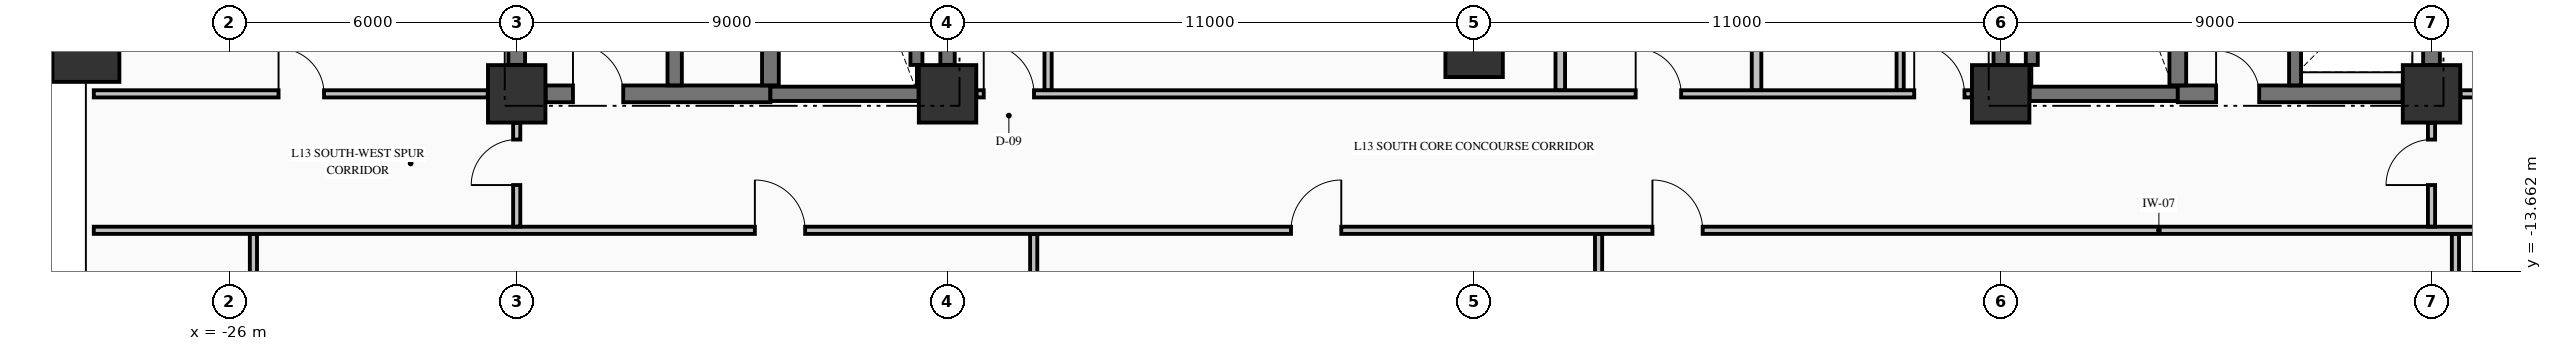
"""IFC4 building model, lengths in metres.
Left out: names, types, materials, properties, quantities, classifications, styles, units other than length and angle.
Written with IfcOpenShell. Run it as: python <this file> out.ifc"""

import sys

from ifc_helpers import new_model, si_unit, direction, frame, frame_2d, origin, origin_2d, place, context, subcontext, project, spatial, rectangle, extrude, element, fill, save


model = new_model("IFC4")
c1 = context("Model", 3, precision=1e-05, world=origin(), true_north=direction((0.0, 1.0)))
c2 = subcontext(c1, "Body", "Model", "MODEL_VIEW")
j1 = project(units=[si_unit("LENGTHUNIT", "METRE"), si_unit("PLANEANGLEUNIT", "RADIAN")], contexts=[c1])
p1 = place(None, origin())
s1 = spatial("IfcSite", under=j1, at=p1, CompositionType="ELEMENT")
p2 = place(p1, origin())
s2 = spatial("IfcBuilding", under=s1, at=p2, CompositionType="ELEMENT")
p3 = place(p2, frame((0.0, 0.0, 57.19)))
s3 = spatial("IfcBuildingStorey", under=s2, at=p3, CompositionType="ELEMENT", Elevation=57.19)
p4 = place(p3, frame((-29.0, -9.0, -0.425), z_axis=(0.0, 0.0, 1.0), x_axis=(1.0, 0.0, 0.0)))
e1 = element("IfcColumn", 1, at=p4, inside=s3, PredefinedType="COLUMN", context=c2, shape_type="SweptSolid", body=[
    extrude(rectangle(XDim=1.4, YDim=1.4, at=origin_2d()), origin(), (0.0, 0.0, 1.0), 3.695),
])
for number, where, z_axis, x_axis in (
    (2, (-20.0, -9.95, -0.425), (0.0, 0.0, 1.0), (1.0, 0.0, 0.0)),
    (3, (-11.0, -9.95, -0.425), (0.0, 0.0, 1.0), (1.0, 0.0, 0.0)),
    (4, (11.0, -9.95, -0.425), (0.0, 0.0, 1.0), (1.0, 0.0, 0.0)),
    (5, (20.0, -9.95, -0.425), (0.0, 0.0, 1.0), (1.0, 0.0, 0.0)),
    (6, (0.0, -9.0, -0.425), (0.0, 0.0, 1.0), (1.0, 0.0, 0.0)),
):
    element("IfcColumn", number, at=place(p3, frame(where, z_axis=z_axis, x_axis=x_axis)), inside=s3, PredefinedType="COLUMN", context=c2, shape_type="SweptSolid", body=[
        extrude(rectangle(XDim=1.2, YDim=1.2, at=origin_2d()), origin(), (0.0, 0.0, 1.0), 3.695),
    ])
p5 = place(p3, frame((-19.396, -9.95, 0.0), z_axis=(0.0, 0.0, 1.0), x_axis=(1.0, 0.0, 0.0)))
e7 = element("IfcWall", 7, at=p5, inside=s3, PredefinedType="SHEAR", context=c2, shape_type="SweptSolid", body=[
    extrude(rectangle(XDim=4.696, YDim=0.35, at=frame_2d((2.348, 0.0))), origin(), (0.0, 0.0, 1.0), 3.27),
])
p6 = place(p5, frame((0.571, 0.0, 0.0)))
e8 = element("IfcOpeningElement", 8, at=p6, cuts=e7, PredefinedType="OPENING", context=c2, shape_type="SweptSolid", body=[
    extrude(rectangle(XDim=1.05, YDim=2.15, at=frame_2d((0.525, 1.075))), frame((0.0, 0.185, 0.0), z_axis=(0.0, -1.0, 0.0), x_axis=(1.0, 0.0, 0.0)), (0.0, 0.0, 1.0), 0.37),
])
for number, where, z_axis, x_axis in (
    (9, (-14.7, -9.95, 0.0), (0.0, 0.0, 1.0), (1.0, 0.0, 0.0)),
    (10, (11.604, -9.95, 0.0), (0.0, 0.0, 1.0), (1.0, 0.0, 0.0)),
):
    element("IfcWall", number, at=place(p3, frame(where, z_axis=z_axis, x_axis=x_axis)), inside=s3, PredefinedType="SHEAR", context=c2, shape_type="SweptSolid", body=[
        extrude(rectangle(XDim=3.096, YDim=0.3, at=frame_2d((1.548, 0.0))), origin(), (0.0, 0.0, 1.0), 3.27),
    ])
p7 = place(p3, frame((14.7, -9.95, 0.0), z_axis=(0.0, 0.0, 1.0), x_axis=(1.0, 0.0, 0.0)))
e11 = element("IfcWall", 11, at=p7, inside=s3, PredefinedType="SHEAR", context=c2, shape_type="SweptSolid", body=[
    extrude(rectangle(XDim=4.696, YDim=0.35, at=frame_2d((2.348, 0.0))), origin(), (0.0, 0.0, 1.0), 3.27),
])
p8 = place(p7, frame((0.8, 0.0, 0.0)))
e12 = element("IfcOpeningElement", 12, at=p8, cuts=e11, PredefinedType="OPENING", context=c2, shape_type="SweptSolid", body=[
    extrude(rectangle(XDim=0.9, YDim=2.15, at=frame_2d((0.45, 1.075))), frame((0.0, 0.185, 0.0), z_axis=(0.0, -1.0, 0.0), x_axis=(1.0, 0.0, 0.0)), (0.0, 0.0, 1.0), 0.37),
])
p9 = place(p3, frame((-28.835, -12.8, 0.0), z_axis=(0.0, 0.0, 1.0), x_axis=(1.0, 0.0, 0.0)))
e13 = element("IfcWall", 13, at=p9, inside=s3, PredefinedType="PARTITIONING", context=c2, shape_type="SweptSolid", body=[
    extrude(rectangle(XDim=52.67, YDim=0.15, at=frame_2d((26.335, 0.0))), origin(), (0.0, 0.0, 1.0), 3.27),
])
p10 = place(p9, frame((13.81, 0.0, 0.0)))
e14 = element("IfcOpeningElement", 14, at=p10, cuts=e13, PredefinedType="OPENING", context=c2, shape_type="SweptSolid", body=[
    extrude(rectangle(XDim=1.05, YDim=2.15, at=frame_2d((0.525, 1.075))), frame((0.0, 0.085, 0.0), z_axis=(0.0, -1.0, 0.0), x_axis=(1.0, 0.0, 0.0)), (0.0, 0.0, 1.0), 0.17),
])
p11 = place(p9, frame((25.01, 0.0, 0.0)))
e15 = element("IfcOpeningElement", 15, at=p11, cuts=e13, PredefinedType="OPENING", context=c2, shape_type="SweptSolid", body=[
    extrude(rectangle(XDim=1.05, YDim=2.15, at=frame_2d((0.525, 1.075))), frame((0.0, 0.085, 0.0), z_axis=(0.0, -1.0, 0.0), x_axis=(1.0, 0.0, 0.0)), (0.0, 0.0, 1.0), 0.17),
])
p12 = place(p9, frame((32.56, 0.0, 0.0)))
e16 = element("IfcOpeningElement", 16, at=p12, cuts=e13, PredefinedType="OPENING", context=c2, shape_type="SweptSolid", body=[
    extrude(rectangle(XDim=1.05, YDim=2.15, at=frame_2d((0.525, 1.075))), frame((0.0, 0.085, 0.0), z_axis=(0.0, -1.0, 0.0), x_axis=(1.0, 0.0, 0.0)), (0.0, 0.0, 1.0), 0.17),
])
p13 = place(p3, frame((-28.835, -9.95, 0.0), z_axis=(0.0, 0.0, 1.0), x_axis=(1.0, 0.0, 0.0)))
e17 = element("IfcWall", 17, at=p13, inside=s3, PredefinedType="PARTITIONING", context=c2, shape_type="SweptSolid", body=[
    extrude(rectangle(XDim=8.229, YDim=0.15, at=frame_2d((4.115, 0.0))), origin(), (0.0, 0.0, 1.0), 3.27),
])
p14 = place(p13, frame((3.86, 0.0, 0.0)))
e18 = element("IfcOpeningElement", 18, at=p14, cuts=e17, PredefinedType="OPENING", context=c2, shape_type="SweptSolid", body=[
    extrude(rectangle(XDim=0.95, YDim=2.15, at=frame_2d((0.475, 1.075))), frame((0.0, 0.085, 0.0), z_axis=(0.0, -1.0, 0.0), x_axis=(1.0, 0.0, 0.0)), (0.0, 0.0, 1.0), 0.17),
])
p15 = place(p3, frame((-10.394, -9.95, 0.0), z_axis=(0.0, 0.0, 1.0), x_axis=(1.0, 0.0, 0.0)))
e19 = element("IfcWall", 19, at=p15, inside=s3, PredefinedType="PARTITIONING", context=c2, shape_type="SweptSolid", body=[
    extrude(rectangle(XDim=20.788, YDim=0.15, at=frame_2d((10.394, 0.0))), origin(), (0.0, 0.0, 1.0), 3.27),
])
p16 = place(p15, frame((0.15, 0.0, 0.0)))
e20 = element("IfcOpeningElement", 20, at=p16, cuts=e19, PredefinedType="OPENING", context=c2, shape_type="SweptSolid", body=[
    extrude(rectangle(XDim=1.05, YDim=2.15, at=frame_2d((0.525, 1.075))), frame((0.0, 0.085, 0.0), z_axis=(0.0, -1.0, 0.0), x_axis=(1.0, 0.0, 0.0)), (0.0, 0.0, 1.0), 0.17),
])
p17 = place(p15, frame((19.588, 0.0, 0.0)))
e21 = element("IfcOpeningElement", 21, at=p17, cuts=e19, PredefinedType="OPENING", context=c2, shape_type="SweptSolid", body=[
    extrude(rectangle(XDim=1.05, YDim=2.15, at=frame_2d((0.525, 1.075))), frame((0.0, 0.085, 0.0), z_axis=(0.0, -1.0, 0.0), x_axis=(1.0, 0.0, 0.0)), (0.0, 0.0, 1.0), 0.17),
])
p18 = place(p15, frame((13.769, 0.0, 0.0)))
e22 = element("IfcOpeningElement", 22, at=p18, cuts=e19, PredefinedType="OPENING", context=c2, shape_type="SweptSolid", body=[
    extrude(rectangle(XDim=0.95, YDim=2.15, at=frame_2d((0.475, 1.075))), frame((0.0, 0.085, 0.0), z_axis=(0.0, -1.0, 0.0), x_axis=(1.0, 0.0, 0.0)), (0.0, 0.0, 1.0), 0.17),
])
p19 = place(p3, frame((20.606, -9.95, 0.0), z_axis=(0.0, 0.0, 1.0), x_axis=(1.0, 0.0, 0.0)))
e23 = element("IfcWall", 23, at=p19, inside=s3, PredefinedType="PARTITIONING", context=c2, shape_type="SweptSolid", body=[
    extrude(rectangle(XDim=3.229, YDim=0.15, at=frame_2d((1.615, 0.0))), origin(), (0.0, 0.0, 1.0), 3.27),
])
p20 = place(p19, frame((0.894, 0.0, 0.0)))
e24 = element("IfcOpeningElement", 24, at=p20, cuts=e23, PredefinedType="OPENING", context=c2, shape_type="SweptSolid", body=[
    extrude(rectangle(XDim=1.0, YDim=2.15, at=frame_2d((0.5, 1.075))), frame((0.0, 0.085, 0.0), z_axis=(0.0, -1.0, 0.0), x_axis=(1.0, 0.0, 0.0)), (0.0, 0.0, 1.0), 0.17),
])
p21 = place(p3, frame((-20.0, -9.346, 0.0), z_axis=(0.0, 0.0, 1.0), x_axis=(0.0, 1.0, 0.0)))
e25 = element("IfcWall", 25, at=p21, inside=s3, PredefinedType="SHEAR", context=c2, shape_type="SweptSolid", body=[
    extrude(rectangle(XDim=8.742, YDim=0.35, at=frame_2d((4.371, 0.0))), origin(), (0.0, 0.0, 1.0), 3.27),
])
p22 = place(p3, frame((-16.7, -9.773, 0.0), z_axis=(0.0, 0.0, 1.0), x_axis=(0.0, 1.0, 0.0)))
e26 = element("IfcWall", 26, at=p22, inside=s3, PredefinedType="SHEAR", context=c2, shape_type="SweptSolid", body=[
    extrude(rectangle(XDim=9.371, YDim=0.3, at=frame_2d((4.686, 0.0))), origin(), (0.0, 0.0, 1.0), 3.27),
])
p23 = place(p3, frame((-14.7, -9.773, 0.0), z_axis=(0.0, 0.0, 1.0), x_axis=(0.0, 1.0, 0.0)))
e27 = element("IfcWall", 27, at=p23, inside=s3, PredefinedType="SHEAR", context=c2, shape_type="SweptSolid", body=[
    extrude(rectangle(XDim=9.371, YDim=0.35, at=frame_2d((4.686, 0.0))), origin(), (0.0, 0.0, 1.0), 3.27),
])
p24 = place(p3, frame((-11.65, -9.346, 0.0), z_axis=(0.0, 0.0, 1.0), x_axis=(0.0, 1.0, 0.0)))
e28 = element("IfcWall", 28, at=p24, inside=s3, PredefinedType="SOLIDWALL", context=c2, shape_type="SweptSolid", body=[
    extrude(rectangle(XDim=8.742, YDim=0.25, at=frame_2d((4.371, 0.0))), origin(), (0.0, 0.0, 1.0), 3.27),
])
for number, where, z_axis, x_axis in (
    (29, (-11.0, -9.346, 0.0), (0.0, 0.0, 1.0), (0.0, 1.0, 0.0)),
    (30, (11.0, -9.346, 0.0), (0.0, 0.0, 1.0), (0.0, 1.0, 0.0)),
):
    element("IfcWall", number, at=place(p3, frame(where, z_axis=z_axis, x_axis=x_axis)), inside=s3, PredefinedType="SHEAR", context=c2, shape_type="SweptSolid", body=[
        extrude(rectangle(XDim=8.742, YDim=0.3, at=frame_2d((4.371, 0.0))), origin(), (0.0, 0.0, 1.0), 3.27),
    ])
p25 = place(p3, frame((11.65, -9.346, 0.0), z_axis=(0.0, 0.0, 1.0), x_axis=(0.0, 1.0, 0.0)))
e31 = element("IfcWall", 31, at=p25, inside=s3, PredefinedType="SOLIDWALL", context=c2, shape_type="SweptSolid", body=[
    extrude(rectangle(XDim=8.742, YDim=0.25, at=frame_2d((4.371, 0.0))), origin(), (0.0, 0.0, 1.0), 3.27),
])
p26 = place(p3, frame((14.7, -9.773, 0.0), z_axis=(0.0, 0.0, 1.0), x_axis=(0.0, 1.0, 0.0)))
e32 = element("IfcWall", 32, at=p26, inside=s3, PredefinedType="SHEAR", context=c2, shape_type="SweptSolid", body=[
    extrude(rectangle(XDim=9.371, YDim=0.35, at=frame_2d((4.686, 0.0))), origin(), (0.0, 0.0, 1.0), 3.27),
])
p27 = place(p3, frame((17.15, -9.773, 0.0), z_axis=(0.0, 0.0, 1.0), x_axis=(0.0, 1.0, 0.0)))
e33 = element("IfcWall", 33, at=p27, inside=s3, PredefinedType="SOLIDWALL", context=c2, shape_type="SweptSolid", body=[
    extrude(rectangle(XDim=2.596, YDim=0.25, at=frame_2d((1.298, 0.0))), origin(), (0.0, 0.0, 1.0), 3.27),
])
p28 = place(p3, frame((20.0, -9.346, 0.0), z_axis=(0.0, 0.0, 1.0), x_axis=(0.0, 1.0, 0.0)))
e34 = element("IfcWall", 34, at=p28, inside=s3, PredefinedType="SHEAR", context=c2, shape_type="SweptSolid", body=[
    extrude(rectangle(XDim=2.169, YDim=0.35, at=frame_2d((1.084, 0.0))), origin(), (0.0, 0.0, 1.0), 3.27),
])
p29 = place(p3, frame((-25.5, -22.294, 0.0), z_axis=(0.0, 0.0, 1.0), x_axis=(0.0, 1.0, 0.0)))
e35 = element("IfcWall", 35, at=p29, inside=s3, PredefinedType="PARTITIONING", context=c2, shape_type="SweptSolid", body=[
    extrude(rectangle(XDim=9.416, YDim=0.15, at=frame_2d((4.708, 0.0))), origin(), (0.0, 0.0, 1.0), 3.27),
])
p30 = place(p3, frame((-20.0, -12.722, 0.0), z_axis=(0.0, 0.0, 1.0), x_axis=(0.0, 1.0, 0.0)))
e36 = element("IfcWall", 36, at=p30, inside=s3, PredefinedType="PARTITIONING", context=c2, shape_type="SweptSolid", body=[
    extrude(rectangle(XDim=2.166, YDim=0.15, at=frame_2d((1.083, 0.0))), origin(), (0.0, 0.0, 1.0), 2.61),
])
p31 = place(p30, frame((0.867, 0.0, 0.0)))
e37 = element("IfcOpeningElement", 37, at=p31, cuts=e36, PredefinedType="OPENING", context=c2, shape_type="SweptSolid", body=[
    extrude(rectangle(XDim=0.95, YDim=2.15, at=frame_2d((0.475, 1.075))), frame((0.0, 0.085, 0.0), z_axis=(0.0, -1.0, 0.0), x_axis=(1.0, 0.0, 0.0)), (0.0, 0.0, 1.0), 0.17),
])
p32 = place(p3, frame((-9.2, -26.335, 0.0), z_axis=(0.0, 0.0, 1.0), x_axis=(0.0, 1.0, 0.0)))
e38 = element("IfcWall", 38, at=p32, inside=s3, PredefinedType="PARTITIONING", context=c2, shape_type="SweptSolid", body=[
    extrude(rectangle(XDim=13.457, YDim=0.15, at=frame_2d((6.729, 0.0))), origin(), (0.0, 0.0, 1.0), 3.27),
])
p33 = place(p3, frame((-8.9, -9.872, 0.0), z_axis=(0.0, 0.0, 1.0), x_axis=(0.0, 1.0, 0.0)))
e39 = element("IfcWall", 39, at=p33, inside=s3, PredefinedType="PARTITIONING", context=c2, shape_type="SweptSolid", body=[
    extrude(rectangle(XDim=11.969, YDim=0.15, at=frame_2d((5.984, 0.0))), origin(), (0.0, 0.0, 1.0), 3.27),
])
p34 = place(p33, frame((5.527, 0.0, 0.0)))
e40 = element("IfcOpeningElement", 40, at=p34, cuts=e39, PredefinedType="OPENING", context=c2, shape_type="SweptSolid", body=[
    extrude(rectangle(XDim=0.95, YDim=2.15, at=frame_2d((0.475, 1.075))), frame((0.0, 0.085, 0.0), z_axis=(0.0, -1.0, 0.0), x_axis=(1.0, 0.0, 0.0)), (0.0, 0.0, 1.0), 0.17),
])
p35 = place(p3, frame((1.8, -9.872, 0.0), z_axis=(0.0, 0.0, 1.0), x_axis=(0.0, 1.0, 0.0)))
e41 = element("IfcWall", 41, at=p35, inside=s3, PredefinedType="PARTITIONING", context=c2, shape_type="SweptSolid", body=[
    extrude(rectangle(XDim=4.969, YDim=0.2, at=frame_2d((2.484, 0.0))), origin(), (0.0, 0.0, 1.0), 3.27),
])
p36 = place(p3, frame((2.6, -26.335, 0.0), z_axis=(0.0, 0.0, 1.0), x_axis=(0.0, 1.0, 0.0)))
e42 = element("IfcWall", 42, at=p36, inside=s3, PredefinedType="PARTITIONING", context=c2, shape_type="SweptSolid", body=[
    extrude(rectangle(XDim=13.457, YDim=0.15, at=frame_2d((6.729, 0.0))), origin(), (0.0, 0.0, 1.0), 3.27),
])
p37 = place(p3, frame((5.9, -9.872, 0.0), z_axis=(0.0, 0.0, 1.0), x_axis=(0.0, 1.0, 0.0)))
e43 = element("IfcWall", 43, at=p37, inside=s3, PredefinedType="PARTITIONING", context=c2, shape_type="SweptSolid", body=[
    extrude(rectangle(XDim=4.969, YDim=0.2, at=frame_2d((2.484, 0.0))), origin(), (0.0, 0.0, 1.0), 3.27),
])
p38 = place(p3, frame((8.9, -9.872, 0.0), z_axis=(0.0, 0.0, 1.0), x_axis=(0.0, 1.0, 0.0)))
e44 = element("IfcWall", 44, at=p38, inside=s3, PredefinedType="PARTITIONING", context=c2, shape_type="SweptSolid", body=[
    extrude(rectangle(XDim=4.969, YDim=0.15, at=frame_2d((2.484, 0.0))), origin(), (0.0, 0.0, 1.0), 3.27),
])
p39 = place(p38, frame((1.997, 0.0, 0.0)))
e45 = element("IfcOpeningElement", 45, at=p39, cuts=e44, PredefinedType="OPENING", context=c2, shape_type="SweptSolid", body=[
    extrude(rectangle(XDim=0.95, YDim=2.15, at=frame_2d((0.475, 1.075))), frame((0.0, 0.085, 0.0), z_axis=(0.0, -1.0, 0.0), x_axis=(1.0, 0.0, 0.0)), (0.0, 0.0, 1.0), 0.17),
])
p40 = place(p3, frame((20.0, -12.722, 0.0), z_axis=(0.0, 0.0, 1.0), x_axis=(0.0, 1.0, 0.0)))
e46 = element("IfcWall", 46, at=p40, inside=s3, PredefinedType="PARTITIONING", context=c2, shape_type="SweptSolid", body=[
    extrude(rectangle(XDim=2.166, YDim=0.15, at=frame_2d((1.083, 0.0))), origin(), (0.0, 0.0, 1.0), 3.27),
])
p41 = place(p40, frame((0.867, 0.0, 0.0)))
e47 = element("IfcOpeningElement", 47, at=p41, cuts=e46, PredefinedType="OPENING", context=c2, shape_type="SweptSolid", body=[
    extrude(rectangle(XDim=0.95, YDim=2.15, at=frame_2d((0.475, 1.075))), frame((0.0, 0.085, 0.0), z_axis=(0.0, -1.0, 0.0), x_axis=(1.0, 0.0, 0.0)), (0.0, 0.0, 1.0), 0.17),
])
p42 = place(p3, frame((20.5, -22.294, 0.0), z_axis=(0.0, 0.0, 1.0), x_axis=(0.0, 1.0, 0.0)))
e48 = element("IfcWall", 48, at=p42, inside=s3, PredefinedType="PARTITIONING", context=c2, shape_type="SweptSolid", body=[
    extrude(rectangle(XDim=9.416, YDim=0.15, at=frame_2d((4.708, 0.0))), origin(), (0.0, 0.0, 1.0), 3.27),
])
p43 = place(p6, origin())
e49 = element("IfcDoor", 49, at=p43, inside=s3, OperationType="SINGLE_SWING_LEFT", PredefinedType="DOOR", context=c2, shape_type="SweptSolid", body=[
    extrude(rectangle(XDim=1.05, YDim=2.15, at=frame_2d((0.525, 1.075))), frame((0.0, 0.025, 0.0), z_axis=(0.0, -1.0, 0.0), x_axis=(1.0, 0.0, 0.0)), (0.0, 0.0, 1.0), 0.05),
])
fill(e8, e49)
p44 = place(p8, origin())
e50 = element("IfcDoor", 50, at=p44, inside=s3, OperationType="SINGLE_SWING_LEFT", PredefinedType="DOOR", context=c2, shape_type="SweptSolid", body=[
    extrude(rectangle(XDim=0.9, YDim=2.15, at=frame_2d((0.45, 1.075))), frame((0.0, 0.025, 0.0), z_axis=(0.0, -1.0, 0.0), x_axis=(1.0, 0.0, 0.0)), (0.0, 0.0, 1.0), 0.05),
])
fill(e12, e50)
p45 = place(p16, origin())
e51 = element("IfcDoor", 51, at=p45, inside=s3, OperationType="SINGLE_SWING_LEFT", PredefinedType="DOOR", context=c2, shape_type="SweptSolid", body=[
    extrude(rectangle(XDim=1.05, YDim=2.15, at=frame_2d((0.525, 1.075))), frame((0.0, 0.025, 0.0), z_axis=(0.0, -1.0, 0.0), x_axis=(1.0, 0.0, 0.0)), (0.0, 0.0, 1.0), 0.05),
])
fill(e20, e51)
p46 = place(p17, origin())
e52 = element("IfcDoor", 52, at=p46, inside=s3, OperationType="SINGLE_SWING_LEFT", PredefinedType="DOOR", context=c2, shape_type="SweptSolid", body=[
    extrude(rectangle(XDim=1.05, YDim=2.15, at=frame_2d((0.525, 1.075))), frame((0.0, 0.025, 0.0), z_axis=(0.0, -1.0, 0.0), x_axis=(1.0, 0.0, 0.0)), (0.0, 0.0, 1.0), 0.05),
])
fill(e21, e52)
p47 = place(p10, origin())
e53 = element("IfcDoor", 53, at=p47, inside=s3, OperationType="SINGLE_SWING_LEFT", PredefinedType="DOOR", context=c2, shape_type="SweptSolid", body=[
    extrude(rectangle(XDim=1.05, YDim=2.15, at=frame_2d((0.525, 1.075))), frame((0.0, 0.025, 0.0), z_axis=(0.0, -1.0, 0.0), x_axis=(1.0, 0.0, 0.0)), (0.0, 0.0, 1.0), 0.05),
])
fill(e14, e53)
p48 = place(p11, origin())
e54 = element("IfcDoor", 54, at=p48, inside=s3, OperationType="SINGLE_SWING_RIGHT", PredefinedType="DOOR", context=c2, shape_type="SweptSolid", body=[
    extrude(rectangle(XDim=1.05, YDim=2.15, at=frame_2d((0.525, 1.075))), frame((0.0, 0.025, 0.0), z_axis=(0.0, -1.0, 0.0), x_axis=(1.0, 0.0, 0.0)), (0.0, 0.0, 1.0), 0.05),
])
fill(e15, e54)
p49 = place(p12, origin())
e55 = element("IfcDoor", 55, at=p49, inside=s3, OperationType="SINGLE_SWING_LEFT", PredefinedType="DOOR", context=c2, shape_type="SweptSolid", body=[
    extrude(rectangle(XDim=1.05, YDim=2.15, at=frame_2d((0.525, 1.075))), frame((0.0, 0.025, 0.0), z_axis=(0.0, -1.0, 0.0), x_axis=(1.0, 0.0, 0.0)), (0.0, 0.0, 1.0), 0.05),
])
fill(e16, e55)
p50 = place(p18, origin())
e56 = element("IfcDoor", 56, at=p50, inside=s3, OperationType="SINGLE_SWING_LEFT", PredefinedType="DOOR", context=c2, shape_type="SweptSolid", body=[
    extrude(rectangle(XDim=0.95, YDim=2.15, at=frame_2d((0.475, 1.075))), frame((0.0, 0.025, 0.0), z_axis=(0.0, -1.0, 0.0), x_axis=(1.0, 0.0, 0.0)), (0.0, 0.0, 1.0), 0.05),
])
fill(e22, e56)
p51 = place(p31, origin())
e57 = element("IfcDoor", 57, at=p51, inside=s3, OperationType="SINGLE_SWING_LEFT", PredefinedType="DOOR", context=c2, shape_type="SweptSolid", body=[
    extrude(rectangle(XDim=0.95, YDim=2.15, at=frame_2d((0.475, 1.075))), frame((0.0, 0.025, 0.0), z_axis=(0.0, -1.0, 0.0), x_axis=(1.0, 0.0, 0.0)), (0.0, 0.0, 1.0), 0.05),
])
fill(e37, e57)
p52 = place(p14, origin())
e58 = element("IfcDoor", 58, at=p52, inside=s3, OperationType="SINGLE_SWING_LEFT", PredefinedType="DOOR", context=c2, shape_type="SweptSolid", body=[
    extrude(rectangle(XDim=0.95, YDim=2.15, at=frame_2d((0.475, 1.075))), frame((0.0, 0.025, 0.0), z_axis=(0.0, -1.0, 0.0), x_axis=(1.0, 0.0, 0.0)), (0.0, 0.0, 1.0), 0.05),
])
fill(e18, e58)
p53 = place(p41, origin())
e59 = element("IfcDoor", 59, at=p53, inside=s3, OperationType="SINGLE_SWING_LEFT", PredefinedType="DOOR", context=c2, shape_type="SweptSolid", body=[
    extrude(rectangle(XDim=0.95, YDim=2.15, at=frame_2d((0.475, 1.075))), frame((0.0, 0.025, 0.0), z_axis=(0.0, -1.0, 0.0), x_axis=(1.0, 0.0, 0.0)), (0.0, 0.0, 1.0), 0.05),
])
fill(e47, e59)
save(model, sys.argv[1])
